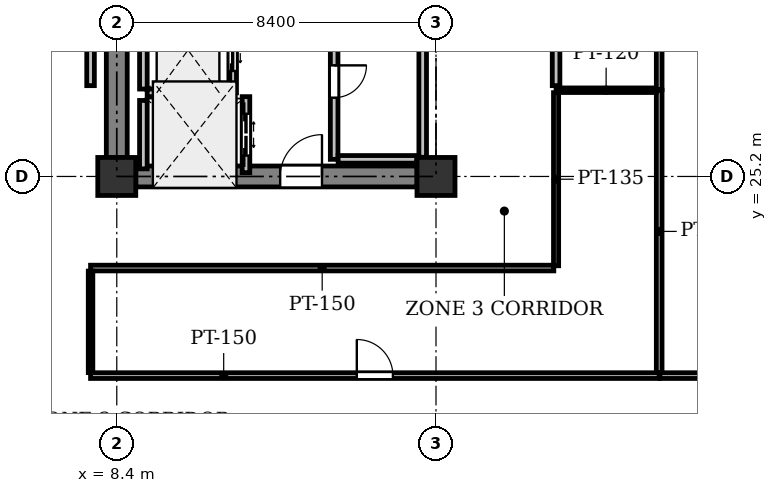
"""IFC4 building model, lengths in metres.
Left out: names, types, materials, properties, quantities, classifications, styles, units other than length and angle.
Written with IfcOpenShell. Run it as: python <this file> out.ifc"""

import sys

from ifc_helpers import new_model, si_unit, direction, frame, frame_2d, origin, origin_2d, place, context, subcontext, project, spatial, rectangle, extrude, element, fill, save


model = new_model("IFC4")
c1 = context("Model", 3, precision=1e-05, world=origin(), true_north=direction((0.0, 1.0)))
c2 = subcontext(c1, "Body", "Model", "MODEL_VIEW")
j1 = project(units=[si_unit("LENGTHUNIT", "METRE"), si_unit("PLANEANGLEUNIT", "RADIAN")], contexts=[c1])
p1 = place(None, origin())
s1 = spatial("IfcSite", under=j1, at=p1, CompositionType="ELEMENT")
p2 = place(p1, origin())
s2 = spatial("IfcBuilding", under=s1, at=p2, CompositionType="ELEMENT")
p3 = place(p2, frame((0.0, 0.0, 208.3)))
s3 = spatial("IfcBuildingStorey", under=s2, at=p3, CompositionType="ELEMENT", Elevation=208.3)
for number, where, z_axis, x_axis in (
    (1, (8.4, 25.2, 0.0), (0.0, 0.0, 1.0), (1.0, 0.0, 0.0)),
    (2, (16.8, 25.2, 0.0), (0.0, 0.0, 1.0), (1.0, 0.0, 0.0)),
):
    element("IfcColumn", number, at=place(p3, frame(where, z_axis=z_axis, x_axis=x_axis)), inside=s3, PredefinedType="COLUMN", context=c2, shape_type="SweptSolid", body=[
        extrude(rectangle(XDim=1.0, YDim=1.0, at=origin_2d()), origin(), (0.0, 0.0, 1.0), 4.1),
    ])
p4 = place(p3, frame((8.4, 25.7, 0.0), z_axis=(0.0, 0.0, 1.0), x_axis=(0.0, 1.0, 0.0)))
e3 = element("IfcWall", 3, at=p4, inside=s3, PredefinedType="SHEAR", context=c2, shape_type="SweptSolid", body=[
    extrude(rectangle(XDim=7.4, YDim=0.55, at=frame_2d((3.7, 0.0))), origin(), (0.0, 0.0, 1.0), 3.825),
])
p5 = place(p3, frame((8.9, 25.2, 0.0), z_axis=(0.0, 0.0, 1.0), x_axis=(1.0, 0.0, 0.0)))
e4 = element("IfcWall", 4, at=p5, inside=s3, PredefinedType="SHEAR", context=c2, shape_type="SweptSolid", body=[
    extrude(rectangle(XDim=7.4, YDim=0.55, at=frame_2d((3.7, 0.0))), origin(), (0.0, 0.0, 1.0), 3.825),
])
p6 = place(p5, frame((3.8, 0.0, 0.0)))
e5 = element("IfcOpeningElement", 5, at=p6, cuts=e4, PredefinedType="OPENING", context=c2, shape_type="SweptSolid", body=[
    extrude(rectangle(XDim=1.1, YDim=2.15, at=frame_2d((0.55, 1.075))), frame((0.0, 0.285, 0.0), z_axis=(0.0, -1.0, 0.0), x_axis=(1.0, 0.0, 0.0)), (0.0, 0.0, 1.0), 0.57),
])
p7 = place(p3, frame((11.45, 27.4, 0.0), z_axis=(0.0, 0.0, 1.0), x_axis=(0.0, 1.0, 0.0)))
e6 = element("IfcWall", 6, at=p7, inside=s3, PredefinedType="PARTITIONING", context=c2, shape_type="SweptSolid", body=[
    extrude(rectangle(XDim=2.25, YDim=0.2, at=frame_2d((1.125, 0.0))), origin(), (0.0, 0.0, 1.0), 3.825),
])
p8 = place(p7, frame((0.575, 0.0, 0.0)))
e7 = element("IfcOpeningElement", 7, at=p8, cuts=e6, PredefinedType="OPENING", context=c2, shape_type="SweptSolid", body=[
    extrude(rectangle(XDim=1.1, YDim=2.2, at=frame_2d((0.55, 1.1))), frame((0.0, 0.11, 0.0), z_axis=(0.0, -1.0, 0.0), x_axis=(1.0, 0.0, 0.0)), (0.0, 0.0, 1.0), 0.22),
])
p9 = place(p3, frame((9.1, 27.5, 0.0), z_axis=(0.0, 0.0, 1.0), x_axis=(0.0, 1.0, 0.0)))
e8 = element("IfcWall", 8, at=p9, inside=s3, PredefinedType="PARTITIONING", context=c2, shape_type="SweptSolid", body=[
    extrude(rectangle(XDim=2.05, YDim=0.2, at=frame_2d((1.025, 0.0))), origin(), (0.0, 0.0, 1.0), 3.825),
])
p10 = place(p3, frame((9.2, 27.4, 0.0), z_axis=(0.0, 0.0, 1.0), x_axis=(1.0, 0.0, 0.0)))
e9 = element("IfcWall", 9, at=p10, inside=s3, PredefinedType="PARTITIONING", context=c2, shape_type="SweptSolid", body=[
    extrude(rectangle(XDim=2.15, YDim=0.2, at=frame_2d((1.075, 0.0))), origin(), (0.0, 0.0, 1.0), 3.825),
])
p11 = place(p3, frame((11.8, 25.3, 0.0), z_axis=(0.0, 0.0, 1.0), x_axis=(0.0, 1.0, 0.0)))
e10 = element("IfcWall", 10, at=p11, inside=s3, PredefinedType="PARTITIONING", context=c2, shape_type="SweptSolid", body=[
    extrude(rectangle(XDim=2.0, YDim=0.2, at=frame_2d((1.0, 0.0))), origin(), (0.0, 0.0, 1.0), 3.825),
])
p12 = place(p11, frame((0.45, 0.0, 0.0)))
e11 = element("IfcOpeningElement", 11, at=p12, cuts=e10, PredefinedType="OPENING", context=c2, shape_type="SweptSolid", body=[
    extrude(rectangle(XDim=1.1, YDim=2.2, at=frame_2d((0.55, 1.1))), frame((0.0, 0.11, 0.0), z_axis=(0.0, -1.0, 0.0), x_axis=(1.0, 0.0, 0.0)), (0.0, 0.0, 1.0), 0.22),
])
p13 = place(p3, frame((9.1, 25.4, 0.0), z_axis=(0.0, 0.0, 1.0), x_axis=(0.0, 1.0, 0.0)))
e12 = element("IfcWall", 12, at=p13, inside=s3, PredefinedType="PARTITIONING", context=c2, shape_type="SweptSolid", body=[
    extrude(rectangle(XDim=1.8, YDim=0.2, at=frame_2d((0.9, 0.0))), origin(), (0.0, 0.0, 1.0), 3.825),
])
p14 = place(p3, frame((16.45, 25.705, 0.0), z_axis=(0.0, 0.0, 1.0), x_axis=(0.0, 1.0, 0.0)))
e13 = element("IfcWall", 13, at=p14, inside=s3, PredefinedType="PARTITIONING", context=c2, shape_type="SweptSolid", body=[
    extrude(rectangle(XDim=4.145, YDim=0.2, at=frame_2d((2.073, 0.0))), origin(), (0.0, 0.0, 1.0), 3.825),
])
p15 = place(p3, frame((14.12, 29.746, 0.0), z_axis=(0.0, 0.0, 1.0), x_axis=(0.0, -1.0, 0.0)))
e14 = element("IfcWall", 14, at=p15, inside=s3, PredefinedType="PARTITIONING", context=c2, shape_type="SweptSolid", body=[
    extrude(rectangle(XDim=4.096, YDim=0.2, at=frame_2d((2.048, 0.0))), origin(), (0.0, 0.0, 1.0), 3.825),
])
p16 = place(p15, frame((1.623, 0.0, 0.0)))
e15 = element("IfcOpeningElement", 15, at=p16, cuts=e14, PredefinedType="OPENING", context=c2, shape_type="SweptSolid", body=[
    extrude(rectangle(XDim=0.85, YDim=2.15, at=frame_2d((0.425, 1.075))), frame((0.0, 0.11, 0.0), z_axis=(0.0, -1.0, 0.0), x_axis=(1.0, 0.0, 0.0)), (0.0, 0.0, 1.0), 0.22),
])
p17 = place(p3, frame((14.224, 25.65, 0.0), z_axis=(0.0, 0.0, 1.0), x_axis=(1.0, 0.0, 0.0)))
e16 = element("IfcWall", 16, at=p17, inside=s3, PredefinedType="PARTITIONING", context=c2, shape_type="SweptSolid", body=[
    extrude(rectangle(XDim=2.071, YDim=0.2, at=frame_2d((1.035, 0.0))), origin(), (0.0, 0.0, 1.0), 3.825),
])
p18 = place(p3, frame((7.71, 19.96, 0.0), z_axis=(0.0, 0.0, 1.0), x_axis=(1.0, 0.0, 0.0)))
e17 = element("IfcWall", 17, at=p18, inside=s3, PredefinedType="PARTITIONING", context=c2, shape_type="SweptSolid", body=[
    extrude(rectangle(XDim=14.963, YDim=0.15, at=frame_2d((7.481, 0.0))), origin(), (0.0, 0.0, 1.0), 3.371),
])
p19 = place(p18, frame((7.007, 0.0, 0.0)))
e18 = element("IfcOpeningElement", 18, at=p19, cuts=e17, PredefinedType="OPENING", context=c2, shape_type="SweptSolid", body=[
    extrude(rectangle(XDim=0.95, YDim=2.15, at=frame_2d((0.475, 1.075))), frame((0.0, 0.085, 0.0), z_axis=(0.0, -1.0, 0.0), x_axis=(1.0, 0.0, 0.0)), (0.0, 0.0, 1.0), 0.17),
])
p20 = place(p3, frame((22.673, 20.039, 0.0), z_axis=(0.0, 0.0, 1.0), x_axis=(0.0, 1.0, 0.0)))
e19 = element("IfcWall", 19, at=p20, inside=s3, PredefinedType="PARTITIONING", context=c2, shape_type="SweptSolid", body=[
    extrude(rectangle(XDim=7.43, YDim=0.15, at=frame_2d((3.715, 0.0))), origin(), (0.0, 0.0, 1.0), 3.365),
])
p21 = place(p3, frame((22.594, 27.469, 0.0), z_axis=(0.0, 0.0, 1.0), x_axis=(-1.0, 0.0, 0.0)))
e20 = element("IfcWall", 20, at=p21, inside=s3, PredefinedType="PARTITIONING", context=c2, shape_type="SweptSolid", body=[
    extrude(rectangle(XDim=2.634, YDim=0.12, at=frame_2d((1.317, 0.0))), origin(), (0.0, 0.0, 1.0), 3.518),
])
p22 = place(p3, frame((19.96, 27.405, 0.0), z_axis=(0.0, 0.0, 1.0), x_axis=(0.0, -1.0, 0.0)))
e21 = element("IfcWall", 21, at=p22, inside=s3, PredefinedType="PARTITIONING", context=c2, shape_type="SweptSolid", body=[
    extrude(rectangle(XDim=4.555, YDim=0.135, at=frame_2d((2.278, 0.0))), origin(), (0.0, 0.0, 1.0), 3.365),
])
p23 = place(p3, frame((19.9, 22.79, 0.0), z_axis=(0.0, 0.0, 1.0), x_axis=(-1.0, 0.0, 0.0)))
e22 = element("IfcWall", 22, at=p23, inside=s3, PredefinedType="PARTITIONING", context=c2, shape_type="SweptSolid", body=[
    extrude(rectangle(XDim=12.19, YDim=0.15, at=frame_2d((6.095, 0.0))), origin(), (0.0, 0.0, 1.0), 3.371),
])
p24 = place(p3, frame((7.71, 22.711, 0.0), z_axis=(0.0, 0.0, 1.0), x_axis=(0.0, -1.0, 0.0)))
e23 = element("IfcWall", 23, at=p24, inside=s3, PredefinedType="PARTITIONING", context=c2, shape_type="SweptSolid", body=[
    extrude(rectangle(XDim=2.672, YDim=0.12, at=frame_2d((1.336, 0.0))), origin(), (0.0, 0.0, 1.0), 3.825),
])
p25 = place(p3, frame((22.673, 46.031, 0.0), z_axis=(0.0, 0.0, 1.0), x_axis=(0.0, -1.0, 0.0)))
e24 = element("IfcWall", 24, at=p25, inside=s3, PredefinedType="PARTITIONING", context=c2, shape_type="SweptSolid", body=[
    extrude(rectangle(XDim=18.542, YDim=0.15, at=frame_2d((9.271, 0.0))), origin(), (0.0, 0.0, 1.0), 3.365),
])
p26 = place(p3, frame((22.693, 19.96, 0.0), z_axis=(0.0, 0.0, 1.0), x_axis=(1.0, 0.0, 0.0)))
e25 = element("IfcWall", 25, at=p26, inside=s3, PredefinedType="PARTITIONING", context=c2, shape_type="SweptSolid", body=[
    extrude(rectangle(XDim=13.957, YDim=0.15, at=frame_2d((6.979, 0.0))), origin(), (0.0, 0.0, 1.0), 3.371),
])
p27 = place(p26, frame((6.503, 0.0, 0.0)))
e26 = element("IfcOpeningElement", 26, at=p27, cuts=e25, PredefinedType="OPENING", context=c2, shape_type="SweptSolid", body=[
    extrude(rectangle(XDim=0.95, YDim=2.15, at=frame_2d((0.475, 1.075))), frame((0.0, 0.085, 0.0), z_axis=(0.0, -1.0, 0.0), x_axis=(1.0, 0.0, 0.0)), (0.0, 0.0, 1.0), 0.17),
])
p28 = place(p3, frame((7.71, 43.006, 0.0), z_axis=(0.0, 0.0, 1.0), x_axis=(1.5836065e-05, -0.999999999875, 0.0)))
e27 = element("IfcWall", 27, at=p28, inside=s3, PredefinedType="PARTITIONING", context=c2, shape_type="SweptSolid", body=[
    extrude(rectangle(XDim=15.417, YDim=0.2, at=frame_2d((7.708, 0.0))), origin(), (0.0, 0.0, 1.0), 3.365),
])
p29 = place(p3, frame((19.96, 43.006, 0.0), z_axis=(0.0, 0.0, 1.0), x_axis=(1.5836065e-05, -0.999999999875, 0.0)))
e28 = element("IfcWall", 28, at=p29, inside=s3, PredefinedType="PARTITIONING", context=c2, shape_type="SweptSolid", body=[
    extrude(rectangle(XDim=15.417, YDim=0.2, at=frame_2d((7.708, 0.0))), origin(), (0.0, 0.0, 1.0), 3.365),
])
p30 = place(p29, frame((7.208, 0.0, 0.0)))
e29 = element("IfcOpeningElement", 29, at=p30, cuts=e28, PredefinedType="OPENING", context=c2, shape_type="SweptSolid", body=[
    extrude(rectangle(XDim=1.0, YDim=2.15, at=frame_2d((0.5, 1.075))), frame((0.0, 0.11, 0.0), z_axis=(0.0, -1.0, 0.0), x_axis=(1.0, 0.0, 0.0)), (0.0, 0.0, 1.0), 0.22),
])
p31 = place(p6, origin())
e30 = element("IfcDoor", 30, at=p31, inside=s3, OperationType="SINGLE_SWING_RIGHT", PredefinedType="DOOR", context=c2, shape_type="SweptSolid", body=[
    extrude(rectangle(XDim=1.1, YDim=2.15, at=frame_2d((0.55, 1.075))), frame((0.0, 0.025, 0.0), z_axis=(0.0, -1.0, 0.0), x_axis=(1.0, 0.0, 0.0)), (0.0, 0.0, 1.0), 0.05),
])
fill(e5, e30)
p32 = place(p8, origin())
e31 = element("IfcDoor", 31, at=p32, inside=s3, OperationType="DOUBLE_DOOR_SLIDING", PredefinedType="DOOR", context=c2, shape_type="SweptSolid", body=[
    extrude(rectangle(XDim=1.1, YDim=2.2, at=frame_2d((0.55, 1.1))), frame((0.0, 0.025, 0.0), z_axis=(0.0, -1.0, 0.0), x_axis=(1.0, 0.0, 0.0)), (0.0, 0.0, 1.0), 0.05),
])
fill(e7, e31)
p33 = place(p12, origin())
e32 = element("IfcDoor", 32, at=p33, inside=s3, OperationType="DOUBLE_DOOR_SLIDING", PredefinedType="DOOR", context=c2, shape_type="SweptSolid", body=[
    extrude(rectangle(XDim=1.1, YDim=2.2, at=frame_2d((0.55, 1.1))), frame((0.0, 0.025, 0.0), z_axis=(0.0, -1.0, 0.0), x_axis=(1.0, 0.0, 0.0)), (0.0, 0.0, 1.0), 0.05),
])
fill(e11, e32)
p34 = place(p16, origin())
e33 = element("IfcDoor", 33, at=p34, inside=s3, OperationType="SINGLE_SWING_LEFT", PredefinedType="DOOR", context=c2, shape_type="SweptSolid", body=[
    extrude(rectangle(XDim=0.85, YDim=2.15, at=frame_2d((0.425, 1.075))), frame((0.0, 0.025, 0.0), z_axis=(0.0, -1.0, 0.0), x_axis=(1.0, 0.0, 0.0)), (0.0, 0.0, 1.0), 0.05),
])
fill(e15, e33)
p35 = place(p19, origin())
e34 = element("IfcDoor", 34, at=p35, inside=s3, OperationType="SINGLE_SWING_LEFT", PredefinedType="DOOR", context=c2, shape_type="SweptSolid", body=[
    extrude(rectangle(XDim=0.95, YDim=2.15, at=frame_2d((0.475, 1.075))), frame((0.0, 0.025, 0.0), z_axis=(0.0, -1.0, 0.0), x_axis=(1.0, 0.0, 0.0)), (0.0, 0.0, 1.0), 0.05),
])
fill(e18, e34)
save(model, sys.argv[1])
